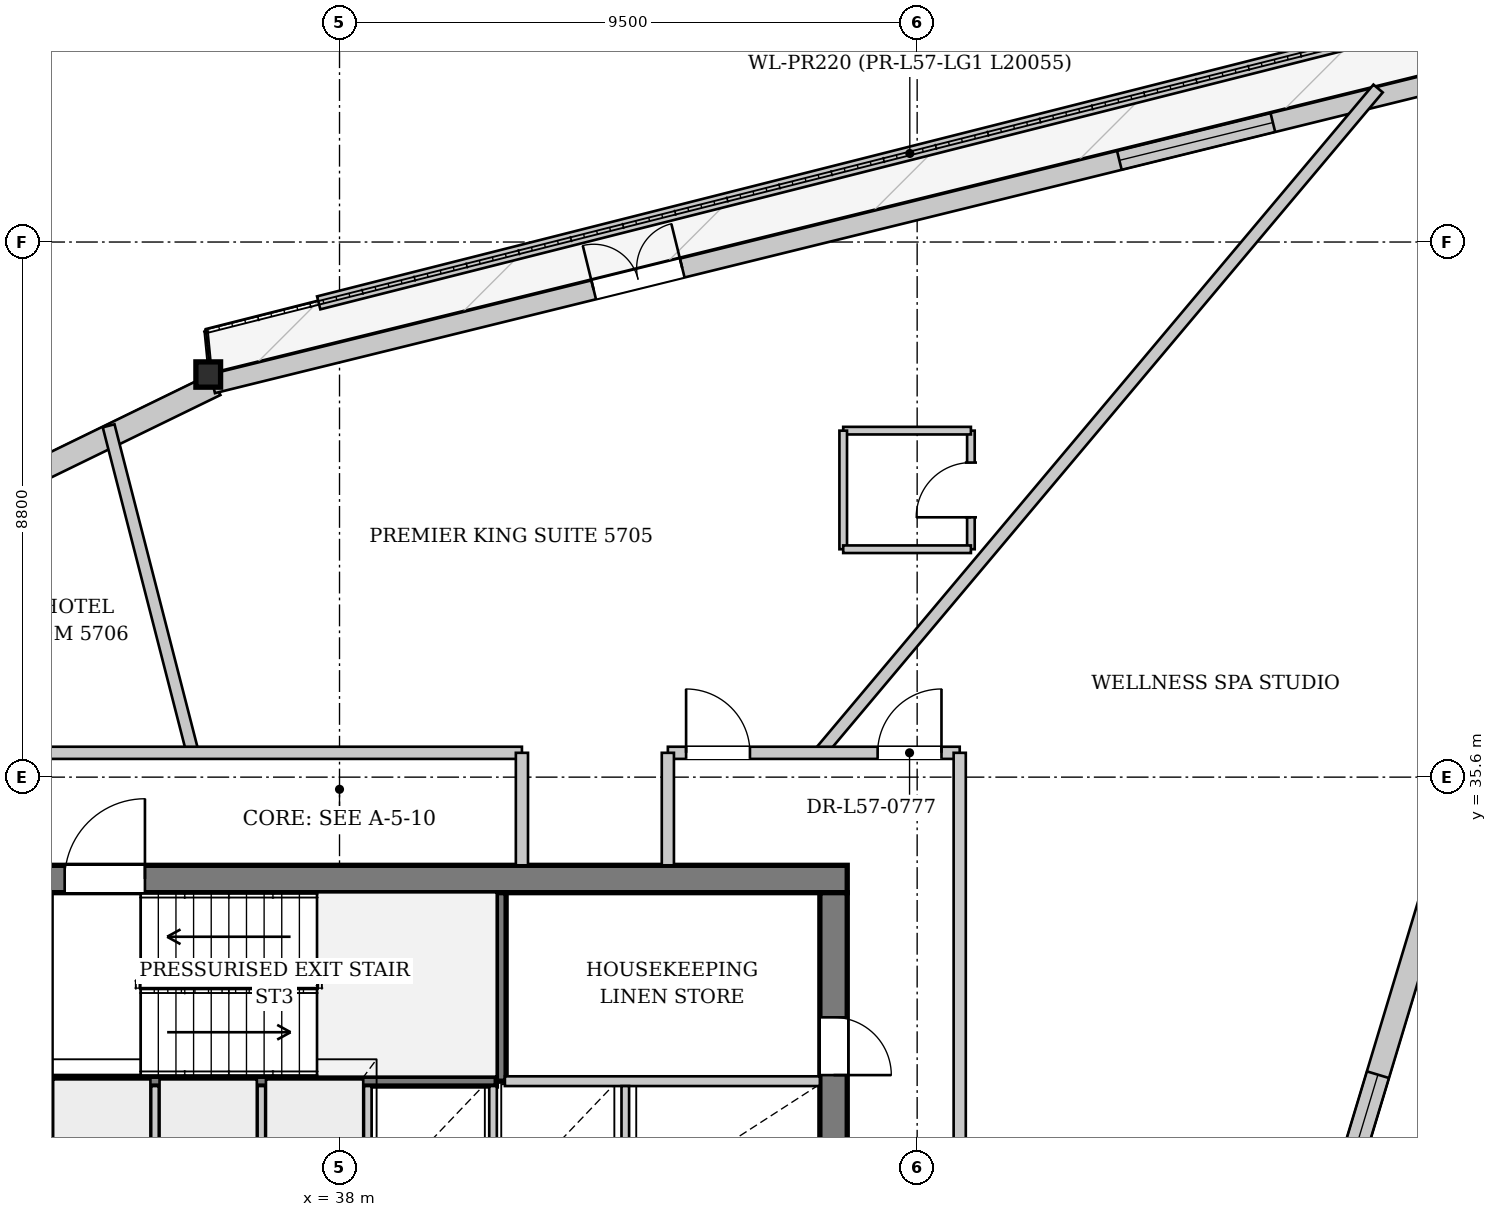
"""IFC4 building model, lengths in metres.
Left out: names, types, materials, properties, quantities, classifications, styles, units other than length and angle.
Written with IfcOpenShell. Run it as: python <this file> out.ifc"""

import sys

from ifc_helpers import new_model, si_unit, direction, frame, frame_2d, origin, origin_2d, place, context, subcontext, project, spatial, rectangle, i_section, extrude, source, transform, mapped, element, fill, save


model = new_model("IFC4")
c1 = context("Model", 3, precision=1e-05, world=origin(), true_north=direction((0.0, 1.0)))
c2 = subcontext(c1, "Body", "Model", "MODEL_VIEW")
j1 = project(units=[si_unit("LENGTHUNIT", "METRE"), si_unit("PLANEANGLEUNIT", "RADIAN")], contexts=[c1])
p1 = place(None, origin())
s1 = spatial("IfcSite", under=j1, at=p1, CompositionType="ELEMENT")
p2 = place(p1, origin())
s2 = spatial("IfcBuilding", under=s1, at=p2, CompositionType="ELEMENT")
p3 = place(p2, frame((0.0, 0.0, 216.7)))
s3 = spatial("IfcBuildingStorey", under=s2, at=p3, CompositionType="ELEMENT", Elevation=216.7)
m1 = source(origin(), c2, "Body", "SweptSolid", [
    extrude(i_section(OverallWidth=0.406, OverallDepth=0.416, WebThickness=0.027, FlangeThickness=0.042, at=origin_2d()), origin(), (0.0, 0.0, 1.0), 3.386),
])
p4 = place(p3, frame((35.875, 42.226, 0.0), z_axis=(-0.02011846258, -0.002740149025, 0.999793848274), x_axis=(0.134954720894, -0.990851766567, 0.0)))
e1 = element("IfcColumn", 1, at=p4, inside=s3, PredefinedType="COLUMN", context=c2, shape_type="MappedRepresentation", body=[
    mapped(m1, transform((0.0, 0.0, 0.0), x_axis=(1.0, 0.0, 0.0), y_axis=(0.0, 1.0, 0.0), z_axis=(0.0, 0.0, 1.0), scale=1.0)),
])
p5 = place(p3, frame((15.72, 32.197, 0.0), z_axis=(0.0, 0.0, 1.0), x_axis=(0.899012313214, 0.437923350246, 0.0)))
e2 = element("IfcWall", 2, at=p5, inside=s3, PredefinedType="SOLIDWALL", context=c2, shape_type="SweptSolid", body=[
    extrude(rectangle(XDim=22.511, YDim=0.38, at=frame_2d((11.256, 0.0))), origin(), (0.0, 0.0, 1.0), 2.822),
])
p6 = place(p5, frame((5.653, 0.0, 0.452)))
e3 = element("IfcOpeningElement", 3, at=p6, cuts=e2, PredefinedType="OPENING", context=c2, shape_type="SweptSolid", body=[
    extrude(rectangle(XDim=2.2, YDim=2.25, at=frame_2d((1.1, 1.125))), frame((0.0, 0.2, 0.0), z_axis=(0.0, -1.0, 0.0), x_axis=(1.0, 0.0, 0.0)), (0.0, 0.0, 1.0), 0.4),
])
p7 = place(p5, frame((15.108, 0.0, 0.452)))
e4 = element("IfcOpeningElement", 4, at=p7, cuts=e2, PredefinedType="OPENING", context=c2, shape_type="SweptSolid", body=[
    extrude(rectangle(XDim=2.2, YDim=2.25, at=frame_2d((1.1, 1.125))), frame((0.0, 0.2, 0.0), z_axis=(0.0, -1.0, 0.0), x_axis=(1.0, 0.0, 0.0)), (0.0, 0.0, 1.0), 0.4),
])
p8 = place(p3, frame((35.913, 42.07, 0.0), z_axis=(0.0, 0.0, 1.0), x_axis=(0.97098567351, 0.239137662942, 0.0)))
e5 = element("IfcWall", 5, at=p8, inside=s3, PredefinedType="SOLIDWALL", context=c2, shape_type="SweptSolid", body=[
    extrude(rectangle(XDim=22.511, YDim=0.32, at=frame_2d((11.256, 0.0))), origin(), (0.0, 0.0, 1.0), 2.822),
])
p9 = place(p8, frame((6.454, 0.0, 0.0)))
e6 = element("IfcOpeningElement", 6, at=p9, cuts=e5, PredefinedType="OPENING", context=c2, shape_type="SweptSolid", body=[
    extrude(rectangle(XDim=1.5, YDim=2.3, at=frame_2d((0.75, 1.15))), frame((0.0, 0.17, 0.0), z_axis=(0.0, -1.0, 0.0), x_axis=(1.0, 0.0, 0.0)), (0.0, 0.0, 1.0), 0.34),
])
p10 = place(p8, frame((15.358, 0.0, 0.352)))
e7 = element("IfcOpeningElement", 7, at=p10, cuts=e5, PredefinedType="OPENING", context=c2, shape_type="SweptSolid", body=[
    extrude(rectangle(XDim=2.6, YDim=2.35, at=frame_2d((1.3, 1.175))), frame((0.0, 0.17, 0.0), z_axis=(0.0, -1.0, 0.0), x_axis=(1.0, 0.0, 0.0)), (0.0, 0.0, 1.0), 0.34),
])
p11 = place(p3, frame((59.556, 45.558, 0.0), z_axis=(0.0, 0.0, 1.0), x_axis=(-0.288699918193, -0.95741963487, 0.0)))
e8 = element("IfcWall", 8, at=p11, inside=s3, PredefinedType="SOLIDWALL", context=c2, shape_type="SweptSolid", body=[
    extrude(rectangle(XDim=23.072, YDim=0.38, at=frame_2d((11.536, 0.0))), origin(), (0.0, 0.0, 1.0), 2.822),
])
p12 = place(p11, frame((5.36, 0.0, 0.452)))
e9 = element("IfcOpeningElement", 9, at=p12, cuts=e8, PredefinedType="OPENING", context=c2, shape_type="SweptSolid", body=[
    extrude(rectangle(XDim=2.2, YDim=2.25, at=frame_2d((1.1, 1.125))), frame((0.0, 0.2, 0.0), z_axis=(0.0, -1.0, 0.0), x_axis=(1.0, 0.0, 0.0)), (0.0, 0.0, 1.0), 0.4),
])
p13 = place(p11, frame((15.512, 0.0, 0.452)))
e10 = element("IfcOpeningElement", 10, at=p13, cuts=e8, PredefinedType="OPENING", context=c2, shape_type="SweptSolid", body=[
    extrude(rectangle(XDim=2.2, YDim=2.25, at=frame_2d((1.1, 1.125))), frame((0.0, 0.2, 0.0), z_axis=(0.0, -1.0, 0.0), x_axis=(1.0, 0.0, 0.0)), (0.0, 0.0, 1.0), 0.4),
])
p14 = place(p3, frame((57.101, 48.313, 0.0), z_axis=(0.0, 0.0, 1.0), x_axis=(-0.969518467451, -0.245018246812, 0.0)))
e11 = element("IfcWall", 11, at=p14, inside=s3, PredefinedType="PARAPET", context=c2, shape_type="SweptSolid", body=[
    extrude(rectangle(XDim=20.055, YDim=0.22, at=frame_2d((10.027, 0.0))), origin(), (0.0, 0.0, 1.0), 0.3),
])
p15 = place(p3, frame((29.65, 33.925, 0.0), z_axis=(0.0, 0.0, 1.0), x_axis=(1.0, 0.0, 0.0)))
e12 = element("IfcWall", 12, at=p15, inside=s3, PredefinedType="SHEAR", context=c2, shape_type="SweptSolid", body=[
    extrude(rectangle(XDim=16.7, YDim=0.45, at=frame_2d((8.35, 0.0))), origin(), (0.0, 0.0, 1.0), 3.33),
])
p16 = place(p15, frame((1.45, 0.0, 0.0)))
e13 = element("IfcOpeningElement", 13, at=p16, cuts=e12, PredefinedType="OPENING", context=c2, shape_type="SweptSolid", body=[
    extrude(rectangle(XDim=0.95, YDim=2.1, at=frame_2d((0.475, 1.05))), frame((0.0, 0.235, 0.0), z_axis=(0.0, -1.0, 0.0), x_axis=(1.0, 0.0, 0.0)), (0.0, 0.0, 1.0), 0.47),
])
p17 = place(p15, frame((3.83, 0.0, 0.0)))
e14 = element("IfcOpeningElement", 14, at=p17, cuts=e12, PredefinedType="OPENING", context=c2, shape_type="SweptSolid", body=[
    extrude(rectangle(XDim=1.32, YDim=2.2, at=frame_2d((0.66, 1.1))), frame((0.0, 0.235, 0.0), z_axis=(0.0, -1.0, 0.0), x_axis=(1.0, 0.0, 0.0)), (0.0, 0.0, 1.0), 0.47),
])
p18 = place(p3, frame((46.125, 33.7, 0.0), z_axis=(0.0, 0.0, 1.0), x_axis=(0.0, -1.0, 0.0)))
e15 = element("IfcWall", 15, at=p18, inside=s3, PredefinedType="SHEAR", context=c2, shape_type="SweptSolid", body=[
    extrude(rectangle(XDim=14.2, YDim=0.45, at=frame_2d((7.1, 0.0))), origin(), (0.0, 0.0, 1.0), 3.33),
])
p19 = place(p18, frame((5.18, 0.0, 0.0)))
e16 = element("IfcOpeningElement", 16, at=p19, cuts=e15, PredefinedType="OPENING", context=c2, shape_type="SweptSolid", body=[
    extrude(rectangle(XDim=1.6, YDim=2.2, at=frame_2d((0.8, 1.1))), frame((0.0, 0.235, 0.0), z_axis=(0.0, -1.0, 0.0), x_axis=(1.0, 0.0, 0.0)), (0.0, 0.0, 1.0), 0.47),
])
p20 = place(p18, frame((2.05, 0.0, 0.0)))
e17 = element("IfcOpeningElement", 17, at=p20, cuts=e15, PredefinedType="OPENING", context=c2, shape_type="SweptSolid", body=[
    extrude(rectangle(XDim=0.95, YDim=2.1, at=frame_2d((0.475, 1.05))), frame((0.0, 0.235, 0.0), z_axis=(0.0, -1.0, 0.0), x_axis=(1.0, 0.0, 0.0)), (0.0, 0.0, 1.0), 0.47),
])
p21 = place(p3, frame((33.28, 30.6, 0.0), z_axis=(0.0, 0.0, 1.0), x_axis=(1.0, 0.0, 0.0)))
e18 = element("IfcWall", 18, at=p21, inside=s3, PredefinedType="PARTITIONING", context=c2, shape_type="SweptSolid", body=[
    extrude(rectangle(XDim=7.3, YDim=0.16, at=frame_2d((3.65, 0.0))), origin(), (0.0, 0.0, 1.0), 3.33),
])
p22 = place(p3, frame((40.66, 30.6, 0.0), z_axis=(0.0, 0.0, 1.0), x_axis=(0.0, 1.0, 0.0)))
e19 = element("IfcWall", 19, at=p22, inside=s3, PredefinedType="PARTITIONING", context=c2, shape_type="SweptSolid", body=[
    extrude(rectangle(XDim=3.1, YDim=0.16, at=frame_2d((1.55, 0.0))), origin(), (0.0, 0.0, 1.0), 3.33),
])
p23 = place(p3, frame((40.72, 30.6, 0.0), z_axis=(0.0, 0.0, 1.0), x_axis=(1.0, 0.0, 0.0)))
e20 = element("IfcWall", 20, at=p23, inside=s3, PredefinedType="PARTITIONING", context=c2, shape_type="SweptSolid", body=[
    extrude(rectangle(XDim=5.18, YDim=0.16, at=frame_2d((2.59, 0.0))), origin(), (0.0, 0.0, 1.0), 3.33),
])
for number, where, z_axis, x_axis in (
    (21, (34.965, 28.6, 0.0), (0.0, 0.0, 1.0), (0.0, 1.0, 0.0)),
    (22, (36.715, 28.6, 0.0), (0.0, 0.0, 1.0), (0.0, 1.0, 0.0)),
    (23, (38.465, 28.6, 0.0), (0.0, 0.0, 1.0), (0.0, 1.0, 0.0)),
    (24, (40.525, 28.6, 0.0), (0.0, 0.0, 1.0), (0.0, 1.0, 0.0)),
    (25, (42.7, 28.6, 0.0), (0.0, 0.0, 1.0), (0.0, 1.0, 0.0)),
):
    element("IfcWall", number, at=place(p3, frame(where, z_axis=z_axis, x_axis=x_axis)), inside=s3, PredefinedType="PARTITIONING", context=c2, shape_type="SweptSolid", body=[
        extrude(rectangle(XDim=1.92, YDim=0.125, at=frame_2d((0.96, 0.0))), origin(), (0.0, 0.0, 1.0), 3.33),
    ])
p24 = place(p3, frame((45.9, 36.0, 0.0), z_axis=(0.0, 0.0, 1.0), x_axis=(0.64336940984, 0.765555878092, 0.0)))
e26 = element("IfcWall", 26, at=p24, inside=s3, PredefinedType="PARTITIONING", context=c2, shape_type="SweptSolid", body=[
    extrude(rectangle(XDim=14.271, YDim=0.2, at=frame_2d((7.135, 0.0))), origin(), (0.0, 0.0, 1.0), 3.33),
])
p25 = place(p3, frame((35.585, 36.0, 0.0), z_axis=(0.0, 0.0, 1.0), x_axis=(-0.248872527689, 0.968536248657, 0.0)))
e27 = element("IfcWall", 27, at=p25, inside=s3, PredefinedType="PARTITIONING", context=c2, shape_type="SweptSolid", body=[
    extrude(rectangle(XDim=5.552, YDim=0.2, at=frame_2d((2.776, 0.0))), origin(), (0.0, 0.0, 1.0), 3.33),
])
p26 = place(p3, frame((48.384, 39.348, 0.0), z_axis=(0.0, 0.0, 1.0), x_axis=(0.0, 1.0, 0.0)))
e28 = element("IfcWall", 28, at=p26, inside=s3, PredefinedType="PARTITIONING", context=c2, shape_type="SweptSolid", body=[
    extrude(rectangle(XDim=1.95, YDim=0.125, at=frame_2d((0.975, 0.0))), origin(), (0.0, 0.0, 1.0), 3.33),
])
p27 = place(p26, frame((0.525, 0.0, 0.0)))
e29 = element("IfcOpeningElement", 29, at=p27, cuts=e28, PredefinedType="OPENING", context=c2, shape_type="SweptSolid", body=[
    extrude(rectangle(XDim=0.9, YDim=2.1, at=frame_2d((0.45, 1.05))), frame((0.0, 0.073, 0.0), z_axis=(0.0, -1.0, 0.0), x_axis=(1.0, 0.0, 0.0)), (0.0, 0.0, 1.0), 0.145),
])
p28 = place(p3, frame((48.384, 41.298, 0.0), z_axis=(0.0, 0.0, 1.0), x_axis=(-1.0, 0.0, 0.0)))
e30 = element("IfcWall", 30, at=p28, inside=s3, PredefinedType="PARTITIONING", context=c2, shape_type="SweptSolid", body=[
    extrude(rectangle(XDim=2.1, YDim=0.125, at=frame_2d((1.05, 0.0))), origin(), (0.0, 0.0, 1.0), 3.075),
])
p29 = place(p3, frame((46.284, 41.298, 0.0), z_axis=(0.0, 0.0, 1.0), x_axis=(0.0, -1.0, 0.0)))
e31 = element("IfcWall", 31, at=p29, inside=s3, PredefinedType="PARTITIONING", context=c2, shape_type="SweptSolid", body=[
    extrude(rectangle(XDim=1.95, YDim=0.125, at=frame_2d((0.975, 0.0))), origin(), (0.0, 0.0, 1.0), 3.33),
])
p30 = place(p3, frame((46.284, 39.348, 0.0), z_axis=(0.0, 0.0, 1.0), x_axis=(1.0, 0.0, 0.0)))
e32 = element("IfcWall", 32, at=p30, inside=s3, PredefinedType="PARTITIONING", context=c2, shape_type="SweptSolid", body=[
    extrude(rectangle(XDim=2.1, YDim=0.125, at=frame_2d((1.05, 0.0))), origin(), (0.0, 0.0, 1.0), 3.33),
])
p31 = place(p3, frame((27.8, 36.0, 0.0), z_axis=(0.0, 0.0, 1.0), x_axis=(1.0, 0.0, 0.0)))
e33 = element("IfcWall", 33, at=p31, inside=s3, PredefinedType="PARTITIONING", context=c2, shape_type="SweptSolid", body=[
    extrude(rectangle(XDim=13.2, YDim=0.2, at=frame_2d((6.6, 0.0))), origin(), (0.0, 0.0, 1.0), 3.33),
])
p32 = place(p31, frame((0.3, 0.0, 0.0)))
e34 = element("IfcOpeningElement", 34, at=p32, cuts=e33, PredefinedType="OPENING", context=c2, shape_type="SweptSolid", body=[
    extrude(rectangle(XDim=1.05, YDim=2.2, at=frame_2d((0.525, 1.1))), frame((0.0, 0.11, 0.0), z_axis=(0.0, -1.0, 0.0), x_axis=(1.0, 0.0, 0.0)), (0.0, 0.0, 1.0), 0.22),
])
p33 = place(p3, frame((41.0, 34.15, 0.0), z_axis=(0.0, 0.0, 1.0), x_axis=(0.0, 1.0, 0.0)))
e35 = element("IfcWall", 35, at=p33, inside=s3, PredefinedType="PARTITIONING", context=c2, shape_type="SweptSolid", body=[
    extrude(rectangle(XDim=1.85, YDim=0.2, at=frame_2d((0.925, 0.0))), origin(), (0.0, 0.0, 1.0), 3.33),
])
p34 = place(p3, frame((43.4, 36.0, 0.0), z_axis=(0.0, 0.0, 1.0), x_axis=(1.0, 0.0, 0.0)))
e36 = element("IfcWall", 36, at=p34, inside=s3, PredefinedType="PARTITIONING", context=c2, shape_type="SweptSolid", body=[
    extrude(rectangle(XDim=4.8, YDim=0.2, at=frame_2d((2.4, 0.0))), origin(), (0.0, 0.0, 1.0), 3.33),
])
p35 = place(p34, frame((3.45, 0.0, 0.0)))
e37 = element("IfcOpeningElement", 37, at=p35, cuts=e36, PredefinedType="OPENING", context=c2, shape_type="SweptSolid", body=[
    extrude(rectangle(XDim=1.05, YDim=2.2, at=frame_2d((0.525, 1.1))), frame((0.0, 0.11, 0.0), z_axis=(0.0, -1.0, 0.0), x_axis=(1.0, 0.0, 0.0)), (0.0, 0.0, 1.0), 0.22),
])
p36 = place(p34, frame((0.3, 0.0, 0.0)))
e38 = element("IfcOpeningElement", 38, at=p36, cuts=e36, PredefinedType="OPENING", context=c2, shape_type="SweptSolid", body=[
    extrude(rectangle(XDim=1.05, YDim=2.2, at=frame_2d((0.525, 1.1))), frame((0.0, 0.11, 0.0), z_axis=(0.0, -1.0, 0.0), x_axis=(1.0, 0.0, 0.0)), (0.0, 0.0, 1.0), 0.22),
])
p37 = place(p3, frame((43.4, 34.15, 0.0), z_axis=(0.0, 0.0, 1.0), x_axis=(0.0, 1.0, 0.0)))
e39 = element("IfcWall", 39, at=p37, inside=s3, PredefinedType="PARTITIONING", context=c2, shape_type="SweptSolid", body=[
    extrude(rectangle(XDim=1.85, YDim=0.2, at=frame_2d((0.925, 0.0))), origin(), (0.0, 0.0, 1.0), 3.33),
])
p38 = place(p3, frame((48.2, 17.2, 0.0), z_axis=(0.0, 0.0, 1.0), x_axis=(0.0, 1.0, 0.0)))
e40 = element("IfcWall", 40, at=p38, inside=s3, PredefinedType="PARTITIONING", context=c2, shape_type="SweptSolid", body=[
    extrude(rectangle(XDim=18.8, YDim=0.2, at=frame_2d((9.4, 0.0))), origin(), (0.0, 0.0, 1.0), 3.33),
])
p39 = place(p38, frame((2.648, 0.0, 0.0)))
e41 = element("IfcOpeningElement", 41, at=p39, cuts=e40, PredefinedType="OPENING", context=c2, shape_type="SweptSolid", body=[
    extrude(rectangle(XDim=1.05, YDim=2.2, at=frame_2d((0.525, 1.1))), frame((0.0, 0.11, 0.0), z_axis=(0.0, -1.0, 0.0), x_axis=(1.0, 0.0, 0.0)), (0.0, 0.0, 1.0), 0.22),
])
m2 = source(origin(), c2, "Body", "SweptSolid", [
    extrude(rectangle(XDim=1.5, YDim=2.3, at=frame_2d((0.75, 1.15))), frame((0.0, 0.025, 0.0), z_axis=(0.0, -1.0, 0.0), x_axis=(1.0, 0.0, 0.0)), (0.0, 0.0, 1.0), 0.05),
])
p40 = place(p9, origin())
e42 = element("IfcDoor", 42, at=p40, inside=s3, OperationType="DOUBLE_DOOR_SINGLE_SWING", PredefinedType="DOOR", context=c2, shape_type="MappedRepresentation", body=[
    mapped(m2, transform((0.0, 0.0, 0.0), x_axis=(1.0, 0.0, 0.0), y_axis=(0.0, 1.0, 0.0), z_axis=(0.0, 0.0, 1.0), scale=1.0)),
])
fill(e6, e42)
m3 = source(origin(), c2, "Body", "SweptSolid", [
    extrude(rectangle(XDim=2.6, YDim=2.35, at=frame_2d((1.3, 1.175))), frame((0.0, 0.03, 0.0), z_axis=(0.0, -1.0, 0.0), x_axis=(1.0, 0.0, 0.0)), (0.0, 0.0, 1.0), 0.06),
])
p41 = place(p10, origin())
e43 = element("IfcWindow", 43, at=p41, inside=s3, PartitioningType="SINGLE_PANEL", PredefinedType="WINDOW", context=c2, shape_type="MappedRepresentation", body=[
    mapped(m3, transform((0.0, 0.0, 0.0), x_axis=(1.0, 0.0, 0.0), y_axis=(0.0, 1.0, 0.0), z_axis=(0.0, 0.0, 1.0), scale=1.0)),
])
fill(e7, e43)
m4 = source(origin(), c2, "Body", "SweptSolid", [
    extrude(rectangle(XDim=2.2, YDim=2.25, at=frame_2d((1.1, 1.125))), frame((0.0, 0.03, 0.0), z_axis=(0.0, -1.0, 0.0), x_axis=(1.0, 0.0, 0.0)), (0.0, 0.0, 1.0), 0.06),
])
p42 = place(p13, origin())
e44 = element("IfcWindow", 44, at=p42, inside=s3, PartitioningType="SINGLE_PANEL", PredefinedType="WINDOW", context=c2, shape_type="MappedRepresentation", body=[
    mapped(m4, transform((0.0, 0.0, 0.0), x_axis=(1.0, 0.0, 0.0), y_axis=(0.0, 1.0, 0.0), z_axis=(0.0, 0.0, 1.0), scale=1.0)),
])
fill(e10, e44)
m5 = source(origin(), c2, "Body", "SweptSolid", [
    extrude(rectangle(XDim=1.32, YDim=2.2, at=frame_2d((0.66, 1.1))), frame((0.0, 0.025, 0.0), z_axis=(0.0, -1.0, 0.0), x_axis=(1.0, 0.0, 0.0)), (0.0, 0.0, 1.0), 0.05),
])
p43 = place(p17, origin())
e45 = element("IfcDoor", 45, at=p43, inside=s3, OperationType="SINGLE_SWING_RIGHT", PredefinedType="DOOR", context=c2, shape_type="MappedRepresentation", body=[
    mapped(m5, transform((0.0, 0.0, 0.0), x_axis=(1.0, 0.0, 0.0), y_axis=(0.0, 1.0, 0.0), z_axis=(0.0, 0.0, 1.0), scale=1.0)),
])
fill(e14, e45)
m6 = source(origin(), c2, "Body", "SweptSolid", [
    extrude(rectangle(XDim=0.95, YDim=2.1, at=frame_2d((0.475, 1.05))), frame((0.0, 0.025, 0.0), z_axis=(0.0, -1.0, 0.0), x_axis=(1.0, 0.0, 0.0)), (0.0, 0.0, 1.0), 0.05),
])
p44 = place(p20, origin())
e46 = element("IfcDoor", 46, at=p44, inside=s3, OperationType="SINGLE_SWING_RIGHT", PredefinedType="DOOR", context=c2, shape_type="MappedRepresentation", body=[
    mapped(m6, transform((0.0, 0.0, 0.0), x_axis=(1.0, 0.0, 0.0), y_axis=(0.0, 1.0, 0.0), z_axis=(0.0, 0.0, 1.0), scale=1.0)),
])
fill(e17, e46)
m7 = source(origin(), c2, "Body", "SweptSolid", [
    extrude(rectangle(XDim=0.9, YDim=2.1, at=frame_2d((0.45, 1.05))), frame((0.0, 0.025, 0.0), z_axis=(0.0, -1.0, 0.0), x_axis=(1.0, 0.0, 0.0)), (0.0, 0.0, 1.0), 0.05),
])
p45 = place(p27, origin())
e47 = element("IfcDoor", 47, at=p45, inside=s3, OperationType="SINGLE_SWING_LEFT", PredefinedType="DOOR", context=c2, shape_type="MappedRepresentation", body=[
    mapped(m7, transform((0.0, 0.0, 0.0), x_axis=(1.0, 0.0, 0.0), y_axis=(0.0, 1.0, 0.0), z_axis=(0.0, 0.0, 1.0), scale=1.0)),
])
fill(e29, e47)
m8 = source(origin(), c2, "Body", "SweptSolid", [
    extrude(rectangle(XDim=1.05, YDim=2.2, at=frame_2d((0.525, 1.1))), frame((0.0, 0.025, 0.0), z_axis=(0.0, -1.0, 0.0), x_axis=(1.0, 0.0, 0.0)), (0.0, 0.0, 1.0), 0.05),
])
p46 = place(p35, origin())
e48 = element("IfcDoor", 48, at=p46, inside=s3, OperationType="SINGLE_SWING_RIGHT", PredefinedType="DOOR", context=c2, shape_type="MappedRepresentation", body=[
    mapped(m8, transform((0.0, 0.0, 0.0), x_axis=(1.0, 0.0, 0.0), y_axis=(0.0, 1.0, 0.0), z_axis=(0.0, 0.0, 1.0), scale=1.0)),
])
fill(e37, e48)
p47 = place(p36, origin())
e49 = element("IfcDoor", 49, at=p47, inside=s3, OperationType="SINGLE_SWING_LEFT", PredefinedType="DOOR", context=c2, shape_type="MappedRepresentation", body=[
    mapped(m8, transform((0.0, 0.0, 0.0), x_axis=(1.0, 0.0, 0.0), y_axis=(0.0, 1.0, 0.0), z_axis=(0.0, 0.0, 1.0), scale=1.0)),
])
fill(e38, e49)
save(model, sys.argv[1])
